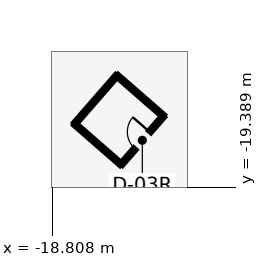
"""IFC4 building model, lengths in metres.
Left out: names, types, materials, properties, quantities, classifications, styles, units other than length and angle.
Written with IfcOpenShell. Run it as: python <this file> out.ifc"""

import sys

from ifc_helpers import new_model, si_unit, direction, frame, frame_2d, origin, place, context, subcontext, project, spatial, rectangle, extrude, element, fill, save


model = new_model("IFC4")
c1 = context("Model", 3, precision=1e-05, world=origin(), true_north=direction((0.0, 1.0)))
c2 = subcontext(c1, "Body", "Model", "MODEL_VIEW")
j1 = project(units=[si_unit("LENGTHUNIT", "METRE"), si_unit("PLANEANGLEUNIT", "RADIAN")], contexts=[c1])
p1 = place(None, origin())
s1 = spatial("IfcSite", under=j1, at=p1, CompositionType="ELEMENT")
p2 = place(p1, origin())
s2 = spatial("IfcBuilding", under=s1, at=p2, CompositionType="ELEMENT")
p3 = place(p2, frame((0.0, 0.0, 181.9)))
s3 = spatial("IfcBuildingStorey", under=s2, at=p3, CompositionType="ELEMENT", Elevation=181.9)
p4 = place(p3, frame((34.398, -5.217, 0.0), z_axis=(0.0, 0.0, 1.0), x_axis=(-0.88294811928, -0.469470572731, 0.0)))
e1 = element("IfcWall", 1, at=p4, inside=s3, PredefinedType="STANDARD", context=c2, shape_type="SweptSolid", body=[
    extrude(rectangle(XDim=55.845, YDim=0.3, at=frame_2d((27.923, 0.0))), origin(), (0.0, 0.0, 1.0), 3.85),
])
p5 = place(p4, frame((27.423, 0.0, 0.0)))
e2 = element("IfcOpeningElement", 2, at=p5, cuts=e1, PredefinedType="OPENING", context=c2, shape_type="SweptSolid", body=[
    extrude(rectangle(XDim=1.0, YDim=2.15, at=frame_2d((0.5, 1.075))), frame((0.0, 0.16, 0.0), z_axis=(0.0, -1.0, 0.0), x_axis=(1.0, 0.0, 0.0)), (0.0, 0.0, 1.0), 0.32),
])
p6 = place(p4, frame((4.823, 0.0, 0.85)))
e3 = element("IfcOpeningElement", 3, at=p6, cuts=e1, PredefinedType="OPENING", context=c2, shape_type="SweptSolid", body=[
    extrude(rectangle(XDim=1.4, YDim=2.2, at=frame_2d((0.7, 1.1))), frame((0.0, 0.16, 0.0), z_axis=(0.0, -1.0, 0.0), x_axis=(1.0, 0.0, 0.0)), (0.0, 0.0, 1.0), 0.32),
])
p7 = place(p4, frame((10.423, 0.0, 0.85)))
e4 = element("IfcOpeningElement", 4, at=p7, cuts=e1, PredefinedType="OPENING", context=c2, shape_type="SweptSolid", body=[
    extrude(rectangle(XDim=1.4, YDim=2.2, at=frame_2d((0.7, 1.1))), frame((0.0, 0.16, 0.0), z_axis=(0.0, -1.0, 0.0), x_axis=(1.0, 0.0, 0.0)), (0.0, 0.0, 1.0), 0.32),
])
p8 = place(p4, frame((21.623, 0.0, 0.85)))
e5 = element("IfcOpeningElement", 5, at=p8, cuts=e1, PredefinedType="OPENING", context=c2, shape_type="SweptSolid", body=[
    extrude(rectangle(XDim=1.4, YDim=2.2, at=frame_2d((0.7, 1.1))), frame((0.0, 0.16, 0.0), z_axis=(0.0, -1.0, 0.0), x_axis=(1.0, 0.0, 0.0)), (0.0, 0.0, 1.0), 0.32),
])
p9 = place(p4, frame((32.823, 0.0, 0.85)))
e6 = element("IfcOpeningElement", 6, at=p9, cuts=e1, PredefinedType="OPENING", context=c2, shape_type="SweptSolid", body=[
    extrude(rectangle(XDim=1.4, YDim=2.2, at=frame_2d((0.7, 1.1))), frame((0.0, 0.16, 0.0), z_axis=(0.0, -1.0, 0.0), x_axis=(1.0, 0.0, 0.0)), (0.0, 0.0, 1.0), 0.32),
])
p10 = place(p4, frame((38.423, 0.0, 0.85)))
e7 = element("IfcOpeningElement", 7, at=p10, cuts=e1, PredefinedType="OPENING", context=c2, shape_type="SweptSolid", body=[
    extrude(rectangle(XDim=1.4, YDim=2.2, at=frame_2d((0.7, 1.1))), frame((0.0, 0.16, 0.0), z_axis=(0.0, -1.0, 0.0), x_axis=(1.0, 0.0, 0.0)), (0.0, 0.0, 1.0), 0.32),
])
p11 = place(p4, frame((44.023, 0.0, 0.85)))
e8 = element("IfcOpeningElement", 8, at=p11, cuts=e1, PredefinedType="OPENING", context=c2, shape_type="SweptSolid", body=[
    extrude(rectangle(XDim=1.4, YDim=2.2, at=frame_2d((0.7, 1.1))), frame((0.0, 0.16, 0.0), z_axis=(0.0, -1.0, 0.0), x_axis=(1.0, 0.0, 0.0)), (0.0, 0.0, 1.0), 0.32),
])
p12 = place(p4, frame((49.623, 0.0, 0.85)))
e9 = element("IfcOpeningElement", 9, at=p12, cuts=e1, PredefinedType="OPENING", context=c2, shape_type="SweptSolid", body=[
    extrude(rectangle(XDim=1.4, YDim=2.2, at=frame_2d((0.7, 1.1))), frame((0.0, 0.16, 0.0), z_axis=(0.0, -1.0, 0.0), x_axis=(1.0, 0.0, 0.0)), (0.0, 0.0, 1.0), 0.32),
])
p13 = place(p3, frame((-16.252, -14.975, 0.0), z_axis=(0.0, 0.0, 1.0), x_axis=(-0.657360622572, -0.753576148701, 0.0)))
e10 = element("IfcWall", 10, at=p13, inside=s3, PredefinedType="PARTITIONING", context=c2, shape_type="SweptSolid", body=[
    extrude(rectangle(XDim=2.54, YDim=0.14, at=frame_2d((1.27, 0.0))), origin(), (0.0, 0.0, 1.0), 3.85),
])
p14 = place(p3, frame((-17.921, -16.889, 0.0), z_axis=(0.0, 0.0, 1.0), x_axis=(0.753592256426, -0.65734215676, 0.0)))
e11 = element("IfcWall", 11, at=p14, inside=s3, PredefinedType="PARTITIONING", context=c2, shape_type="SweptSolid", body=[
    extrude(rectangle(XDim=2.44, YDim=0.14, at=frame_2d((1.22, 0.0))), origin(), (0.0, 0.0, 1.0), 3.85),
])
p15 = place(p3, frame((-16.083, -18.493, 0.0), z_axis=(0.0, 0.0, 1.0), x_axis=(0.657360622572, 0.753576148701, 0.0)))
e12 = element("IfcWall", 12, at=p15, inside=s3, PredefinedType="PARTITIONING", context=c2, shape_type="SweptSolid", body=[
    extrude(rectangle(XDim=2.54, YDim=0.14, at=frame_2d((1.27, 0.0))), origin(), (0.0, 0.0, 1.0), 3.85),
])
p16 = place(p15, frame((0.83, 0.0, 0.0)))
e13 = element("IfcOpeningElement", 13, at=p16, cuts=e12, PredefinedType="OPENING", context=c2, shape_type="SweptSolid", body=[
    extrude(rectangle(XDim=0.88, YDim=2.1, at=frame_2d((0.44, 1.05))), frame((0.0, 0.08, 0.0), z_axis=(0.0, -1.0, 0.0), x_axis=(1.0, 0.0, 0.0)), (0.0, 0.0, 1.0), 0.16),
])
p17 = place(p3, frame((-14.413, -16.579, 0.0), z_axis=(0.0, 0.0, 1.0), x_axis=(-0.753592256426, 0.65734215676, 0.0)))
e14 = element("IfcWall", 14, at=p17, inside=s3, PredefinedType="PARTITIONING", context=c2, shape_type="SweptSolid", body=[
    extrude(rectangle(XDim=2.44, YDim=0.14, at=frame_2d((1.22, 0.0))), origin(), (0.0, 0.0, 1.0), 3.85),
])
p18 = place(p16, origin())
e15 = element("IfcDoor", 15, at=p18, inside=s3, OperationType="SINGLE_SWING_RIGHT", PredefinedType="DOOR", context=c2, shape_type="SweptSolid", body=[
    extrude(rectangle(XDim=0.88, YDim=2.1, at=frame_2d((0.44, 1.05))), frame((0.0, 0.025, 0.0), z_axis=(0.0, -1.0, 0.0), x_axis=(1.0, 0.0, 0.0)), (0.0, 0.0, 1.0), 0.05),
])
fill(e13, e15)
save(model, sys.argv[1])
